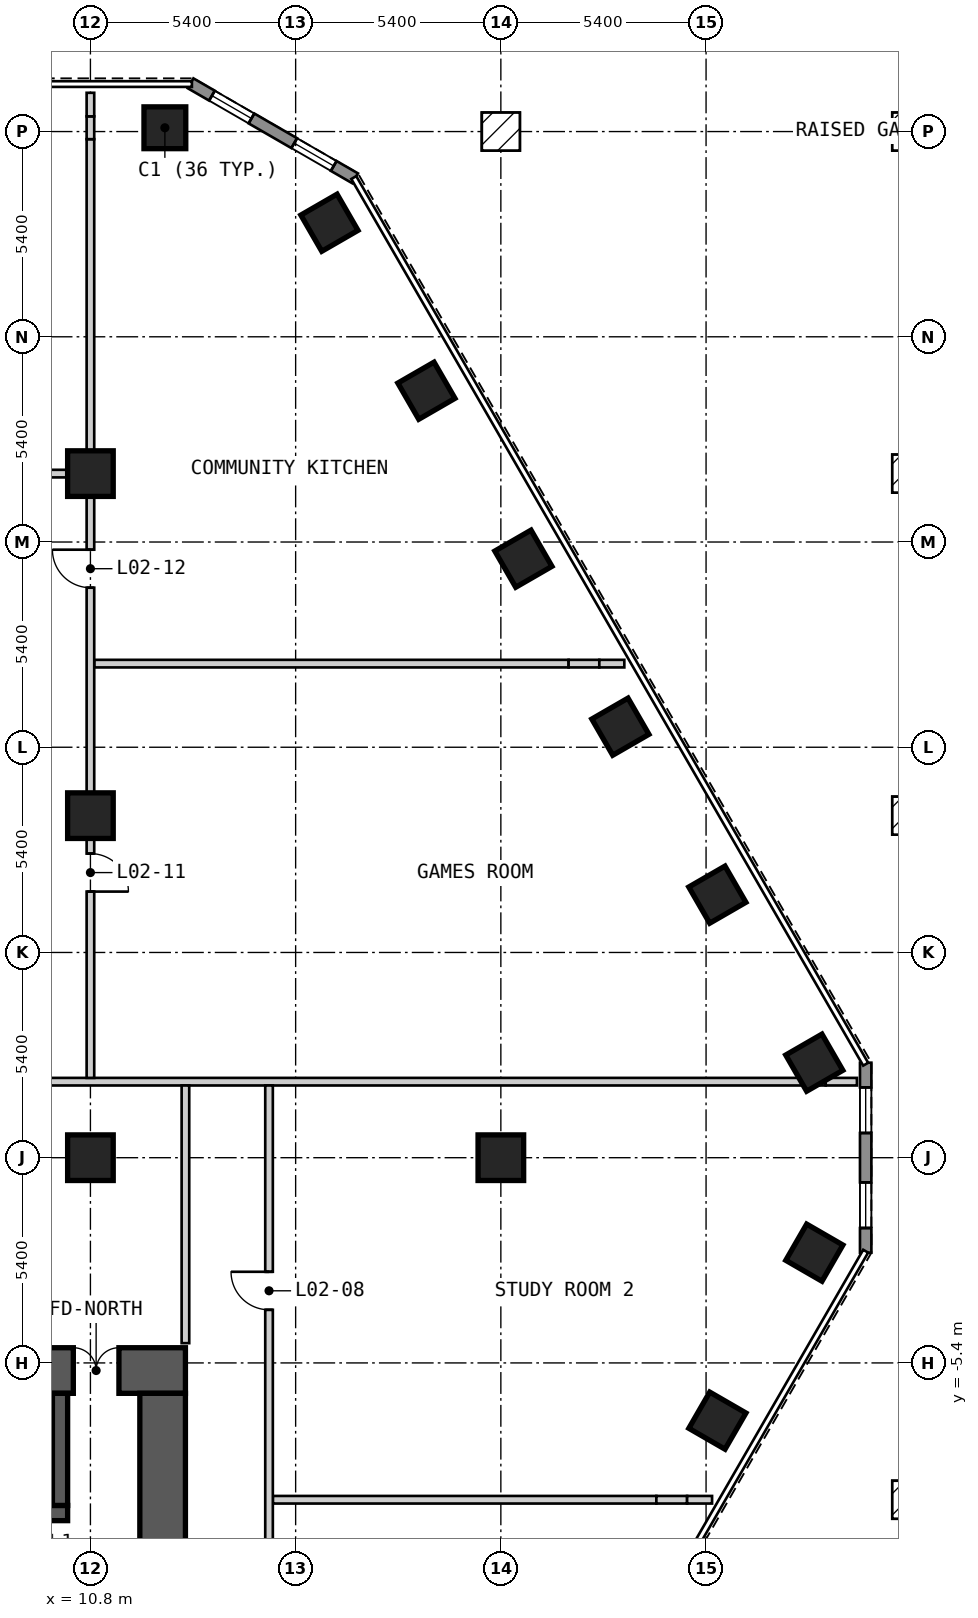
"""IFC4 building model, lengths in metres.
Left out: names, types, materials, properties, quantities, classifications, styles, units other than length and angle.
Written with IfcOpenShell. Run it as: python <this file> out.ifc"""

import sys

from ifc_helpers import new_model, si_unit, direction, frame, frame_2d, origin, origin_2d, place, context, subcontext, project, spatial, polyline, rectangle, outline, extrude, element, fill, save


model = new_model("IFC4")
c1 = context("Model", 3, precision=1e-05, world=origin(), true_north=direction((0.0, 1.0)))
c2 = subcontext(c1, "Body", "Model", "MODEL_VIEW")
j1 = project(units=[si_unit("LENGTHUNIT", "METRE"), si_unit("PLANEANGLEUNIT", "RADIAN")], contexts=[c1])
p1 = place(None, origin())
s1 = spatial("IfcSite", under=j1, at=p1, CompositionType="ELEMENT")
p2 = place(p1, origin())
s2 = spatial("IfcBuilding", under=s1, at=p2, CompositionType="ELEMENT")
p3 = place(p2, frame((0.0, 0.0, 9.0)))
s3 = spatial("IfcBuildingStorey", under=s2, at=p3, CompositionType="ELEMENT", Elevation=9.0)
for number, where, z_axis, x_axis in (
    (1, (12.759, 27.1, 0.0), (0.0, 0.0, 1.0), (-1.0, 0.0, 0.0)),
    (2, (27.298, -6.919, 0.0), (0.0, 0.0, 1.0), (0.5, 0.866, 0.0)),
    (3, (29.849, -2.499, 0.0), (0.0, 0.0, 1.0), (0.5, 0.866, 0.0)),
    (4, (29.848, 2.5, 0.0), (0.0, 0.0, 1.0), (-0.5, 0.866, 0.0)),
    (5, (27.297, 6.921, 0.0), (0.0, 0.0, 1.0), (-0.5, 0.866, 0.0)),
    (6, (24.745, 11.341, 0.0), (0.0, 0.0, 1.0), (-0.5, 0.866, 0.0)),
    (7, (22.193, 15.761, 0.0), (0.0, 0.0, 1.0), (-0.5, 0.866, 0.0)),
    (8, (19.641, 20.181, 0.0), (0.0, 0.0, 1.0), (-0.5, 0.866, 0.0)),
    (9, (17.089, 24.601, 0.0), (0.0, 0.0, 1.0), (-0.5, 0.866, 0.0)),
):
    element("IfcColumn", number, at=place(p3, frame(where, z_axis=z_axis, x_axis=x_axis)), inside=s3, PredefinedType="COLUMN", context=c2, shape_type="SweptSolid", body=[
        extrude(rectangle(XDim=1.1, YDim=1.1, at=origin_2d()), origin(), (0.0, 0.0, 1.0), 3.6),
    ])
for number, where, z_axis, x_axis in (
    (10, (10.8, 0.0, 0.0), (0.0, 0.0, 1.0), (1.0, 0.0, 0.0)),
    (11, (10.8, 9.0, 0.0), (0.0, 0.0, 1.0), (1.0, 0.0, 0.0)),
    (12, (10.8, 18.0, 0.0), (0.0, 0.0, 1.0), (1.0, 0.0, 0.0)),
    (13, (21.6, 0.0, 0.0), (0.0, 0.0, 1.0), (1.0, 0.0, 0.0)),
):
    element("IfcColumn", number, at=place(p3, frame(where, z_axis=z_axis, x_axis=x_axis)), inside=s3, PredefinedType="COLUMN", context=c2, shape_type="SweptSolid", body=[
        extrude(rectangle(XDim=1.2, YDim=1.2, at=origin_2d()), origin(), (0.0, 0.0, 1.0), 3.6),
    ])
p4 = place(p3, frame((-13.3, -5.6, 0.0), z_axis=(0.0, 0.0, 1.0), x_axis=(1.0, 0.0, 0.0)))
e14 = element("IfcWall", 14, at=p4, inside=s3, PredefinedType="SHEAR", context=c2, shape_type="SweptSolid", body=[
    extrude(rectangle(XDim=26.6, YDim=1.2, at=frame_2d((13.3, 0.0))), origin(), (0.0, 0.0, 1.0), 3.25),
])
p5 = place(p4, frame((23.65, 0.0, 0.0)))
e15 = element("IfcOpeningElement", 15, at=p5, cuts=e14, PredefinedType="OPENING", context=c2, shape_type="SweptSolid", body=[
    extrude(rectangle(XDim=1.2, YDim=2.1, at=frame_2d((0.6, 1.05))), frame((0.0, 0.61, 0.0), z_axis=(0.0, -1.0, 0.0), x_axis=(1.0, 0.0, 0.0)), (0.0, 0.0, 1.0), 1.22),
])
p6 = place(p3, frame((12.7, -17.8, 0.0), z_axis=(0.0, 0.0, 1.0), x_axis=(0.0, 1.0, 0.0)))
e16 = element("IfcWall", 16, at=p6, inside=s3, PredefinedType="SHEAR", context=c2, shape_type="SweptSolid", body=[
    extrude(rectangle(XDim=11.6, YDim=1.2, at=frame_2d((5.8, 0.0))), origin(), (0.0, 0.0, 1.0), 3.25),
])
p7 = place(p3, frame((-12.1, -9.35, 0.0), z_axis=(0.0, 0.0, 1.0), x_axis=(1.0, 0.0, 0.0)))
e17 = element("IfcWall", 17, at=p7, inside=s3, PredefinedType="SHEAR", context=c2, shape_type="SweptSolid", body=[
    extrude(rectangle(XDim=22.3, YDim=0.4, at=frame_2d((11.15, 0.0))), origin(), (0.0, 0.0, 1.0), 3.25),
])
p8 = place(p7, frame((0.7, 0.0, 0.0)))
e18 = element("IfcOpeningElement", 18, at=p8, cuts=e17, PredefinedType="OPENING", context=c2, shape_type="SweptSolid", body=[
    extrude(rectangle(XDim=1.1, YDim=2.1, at=frame_2d((0.55, 1.05))), frame((0.0, 0.21, 0.0), z_axis=(0.0, -1.0, 0.0), x_axis=(1.0, 0.0, 0.0)), (0.0, 0.0, 1.0), 0.42),
])
p9 = place(p7, frame((3.5, 0.0, 0.0)))
e19 = element("IfcOpeningElement", 19, at=p9, cuts=e17, PredefinedType="OPENING", context=c2, shape_type="SweptSolid", body=[
    extrude(rectangle(XDim=1.1, YDim=2.1, at=frame_2d((0.55, 1.05))), frame((0.0, 0.21, 0.0), z_axis=(0.0, -1.0, 0.0), x_axis=(1.0, 0.0, 0.0)), (0.0, 0.0, 1.0), 0.42),
])
p10 = place(p7, frame((6.3, 0.0, 0.0)))
e20 = element("IfcOpeningElement", 20, at=p10, cuts=e17, PredefinedType="OPENING", context=c2, shape_type="SweptSolid", body=[
    extrude(rectangle(XDim=1.1, YDim=2.1, at=frame_2d((0.55, 1.05))), frame((0.0, 0.21, 0.0), z_axis=(0.0, -1.0, 0.0), x_axis=(1.0, 0.0, 0.0)), (0.0, 0.0, 1.0), 0.42),
])
p11 = place(p7, frame((8.6, 0.0, 0.0)))
e21 = element("IfcOpeningElement", 21, at=p11, cuts=e17, PredefinedType="OPENING", context=c2, shape_type="SweptSolid", body=[
    extrude(rectangle(XDim=1.1, YDim=2.1, at=frame_2d((0.55, 1.05))), frame((0.0, 0.21, 0.0), z_axis=(0.0, -1.0, 0.0), x_axis=(1.0, 0.0, 0.0)), (0.0, 0.0, 1.0), 0.42),
])
p12 = place(p7, frame((10.9, 0.0, 0.0)))
e22 = element("IfcOpeningElement", 22, at=p12, cuts=e17, PredefinedType="OPENING", context=c2, shape_type="SweptSolid", body=[
    extrude(rectangle(XDim=1.1, YDim=2.1, at=frame_2d((0.55, 1.05))), frame((0.0, 0.21, 0.0), z_axis=(0.0, -1.0, 0.0), x_axis=(1.0, 0.0, 0.0)), (0.0, 0.0, 1.0), 0.42),
])
p13 = place(p7, frame((13.2, 0.0, 0.0)))
e23 = element("IfcOpeningElement", 23, at=p13, cuts=e17, PredefinedType="OPENING", context=c2, shape_type="SweptSolid", body=[
    extrude(rectangle(XDim=1.1, YDim=2.1, at=frame_2d((0.55, 1.05))), frame((0.0, 0.21, 0.0), z_axis=(0.0, -1.0, 0.0), x_axis=(1.0, 0.0, 0.0)), (0.0, 0.0, 1.0), 0.42),
])
p14 = place(p7, frame((15.5, 0.0, 0.0)))
e24 = element("IfcOpeningElement", 24, at=p14, cuts=e17, PredefinedType="OPENING", context=c2, shape_type="SweptSolid", body=[
    extrude(rectangle(XDim=1.1, YDim=2.1, at=frame_2d((0.55, 1.05))), frame((0.0, 0.21, 0.0), z_axis=(0.0, -1.0, 0.0), x_axis=(1.0, 0.0, 0.0)), (0.0, 0.0, 1.0), 0.42),
])
p15 = place(p7, frame((17.8, 0.0, 0.0)))
e25 = element("IfcOpeningElement", 25, at=p15, cuts=e17, PredefinedType="OPENING", context=c2, shape_type="SweptSolid", body=[
    extrude(rectangle(XDim=1.1, YDim=2.1, at=frame_2d((0.55, 1.05))), frame((0.0, 0.21, 0.0), z_axis=(0.0, -1.0, 0.0), x_axis=(1.0, 0.0, 0.0)), (0.0, 0.0, 1.0), 0.42),
])
p16 = place(p7, frame((20.2, 0.0, 0.0)))
e26 = element("IfcOpeningElement", 26, at=p16, cuts=e17, PredefinedType="OPENING", context=c2, shape_type="SweptSolid", body=[
    extrude(rectangle(XDim=1.1, YDim=2.1, at=frame_2d((0.55, 1.05))), frame((0.0, 0.21, 0.0), z_axis=(0.0, -1.0, 0.0), x_axis=(1.0, 0.0, 0.0)), (0.0, 0.0, 1.0), 0.42),
])
p17 = place(p3, frame((10.0, -9.15, 0.0), z_axis=(0.0, 0.0, 1.0), x_axis=(0.0, 1.0, 0.0)))
e27 = element("IfcWall", 27, at=p17, inside=s3, PredefinedType="SHEAR", context=c2, shape_type="SweptSolid", body=[
    extrude(rectangle(XDim=2.95, YDim=0.4, at=frame_2d((1.475, 0.0))), origin(), (0.0, 0.0, 1.0), 3.25),
])
p18 = place(p3, frame((31.2, -2.5, 0.0), z_axis=(0.0, 0.0, 1.0), x_axis=(0.0, 1.0, 0.0)))
e28 = element("IfcWall", 28, at=p18, inside=s3, PredefinedType="SOLIDWALL", context=c2, shape_type="SweptSolid", body=[
    extrude(outline(polyline([(0.0, -0.15), (5.0, -0.15), (4.92, 0.15), (0.08, 0.15), (0.0, -0.15)])), origin(), (0.0, 0.0, 1.0), 3.25),
])
p19 = place(p18, frame((0.65, 0.0, 0.15)))
e29 = element("IfcOpeningElement", 29, at=p19, cuts=e28, PredefinedType="OPENING", context=c2, shape_type="SweptSolid", body=[
    extrude(rectangle(XDim=1.2, YDim=2.1, at=frame_2d((0.6, 1.05))), frame((0.0, 0.16, 0.0), z_axis=(0.0, -1.0, 0.0), x_axis=(1.0, 0.0, 0.0)), (0.0, 0.0, 1.0), 0.32),
])
p20 = place(p18, frame((3.15, 0.0, 0.15)))
e30 = element("IfcOpeningElement", 30, at=p20, cuts=e28, PredefinedType="OPENING", context=c2, shape_type="SweptSolid", body=[
    extrude(rectangle(XDim=1.2, YDim=2.1, at=frame_2d((0.6, 1.05))), frame((0.0, 0.16, 0.0), z_axis=(0.0, -1.0, 0.0), x_axis=(1.0, 0.0, 0.0)), (0.0, 0.0, 1.0), 0.32),
])
p21 = place(p3, frame((17.765, 25.77, 0.0), z_axis=(0.0, 0.0, 1.0), x_axis=(-0.866010750942, 0.50002537861, 0.0)))
e31 = element("IfcWall", 31, at=p21, inside=s3, PredefinedType="SOLIDWALL", context=c2, shape_type="SweptSolid", body=[
    extrude(outline(polyline([(0.0, -0.15), (5.0, -0.15), (4.919, 0.15), (0.08, 0.15), (0.0, -0.15)])), origin(), (0.0, 0.0, 1.0), 3.25),
])
p22 = place(p21, frame((0.65, 0.0, 0.15)))
e32 = element("IfcOpeningElement", 32, at=p22, cuts=e31, PredefinedType="OPENING", context=c2, shape_type="SweptSolid", body=[
    extrude(rectangle(XDim=1.2, YDim=2.1, at=frame_2d((0.6, 1.05))), frame((0.0, 0.16, 0.0), z_axis=(0.0, -1.0, 0.0), x_axis=(1.0, 0.0, 0.0)), (0.0, 0.0, 1.0), 0.32),
])
p23 = place(p21, frame((3.15, 0.0, 0.15)))
e33 = element("IfcOpeningElement", 33, at=p23, cuts=e31, PredefinedType="OPENING", context=c2, shape_type="SweptSolid", body=[
    extrude(rectangle(XDim=1.2, YDim=2.1, at=frame_2d((0.6, 1.05))), frame((0.0, 0.16, 0.0), z_axis=(0.0, -1.0, 0.0), x_axis=(1.0, 0.0, 0.0)), (0.0, 0.0, 1.0), 0.32),
])
p24 = place(p3, frame((15.6, -9.0, 0.0), z_axis=(0.0, 0.0, 1.0), x_axis=(1.0, 0.0, 0.0)))
e34 = element("IfcWall", 34, at=p24, inside=s3, PredefinedType="PARTITIONING", context=c2, shape_type="SweptSolid", body=[
    extrude(rectangle(XDim=10.092, YDim=0.2, at=frame_2d((5.046, 0.0))), origin(), (0.0, 0.0, 1.0), 3.25),
])
p25 = place(p3, frame((25.692, -9.0, 0.0), z_axis=(0.0, 0.0, 1.0), x_axis=(1.0, 0.0, 0.0)))
e35 = element("IfcWall", 35, at=p25, inside=s3, PredefinedType="PARTITIONING", context=c2, shape_type="SweptSolid", body=[
    extrude(rectangle(XDim=0.809, YDim=0.2, at=frame_2d((0.405, 0.0))), origin(), (0.0, 0.0, 1.0), 2.52),
])
p26 = place(p3, frame((26.501, -9.0, 0.0), z_axis=(0.0, 0.0, 1.0), x_axis=(1.0, 0.0, 0.0)))
e36 = element("IfcWall", 36, at=p26, inside=s3, PredefinedType="PARTITIONING", context=c2, shape_type="SweptSolid", body=[
    extrude(rectangle(XDim=0.657, YDim=0.2, at=frame_2d((0.329, 0.0))), origin(), (0.0, 0.0, 1.0), 3.25),
])
p27 = place(p3, frame((-29.549, 2.0, 0.0), z_axis=(0.0, 0.0, 1.0), x_axis=(1.0, 0.0, 0.0)))
e37 = element("IfcWall", 37, at=p27, inside=s3, PredefinedType="PARTITIONING", context=c2, shape_type="SweptSolid", body=[
    extrude(rectangle(XDim=59.097, YDim=0.2, at=frame_2d((29.549, 0.0))), origin(), (0.0, 0.0, 1.0), 3.25),
])
p28 = place(p27, frame((20.651, 0.0, 0.0)))
e38 = element("IfcOpeningElement", 38, at=p28, cuts=e37, PredefinedType="OPENING", context=c2, shape_type="SweptSolid", body=[
    extrude(rectangle(XDim=1.8, YDim=2.1, at=frame_2d((0.9, 1.05))), frame((0.0, 0.11, 0.0), z_axis=(0.0, -1.0, 0.0), x_axis=(1.0, 0.0, 0.0)), (0.0, 0.0, 1.0), 0.22),
])
p29 = place(p27, frame((36.647, 0.0, 0.0)))
e39 = element("IfcOpeningElement", 39, at=p29, cuts=e37, PredefinedType="OPENING", context=c2, shape_type="SweptSolid", body=[
    extrude(rectangle(XDim=1.8, YDim=2.1, at=frame_2d((0.9, 1.05))), frame((0.0, 0.11, 0.0), z_axis=(0.0, -1.0, 0.0), x_axis=(1.0, 0.0, 0.0)), (0.0, 0.0, 1.0), 0.22),
])
p30 = place(p27, frame((28.649, 0.0, 0.0)))
e40 = element("IfcOpeningElement", 40, at=p30, cuts=e37, PredefinedType="OPENING", context=c2, shape_type="SweptSolid", body=[
    extrude(rectangle(XDim=1.8, YDim=2.1, at=frame_2d((0.9, 1.05))), frame((0.0, 0.11, 0.0), z_axis=(0.0, -1.0, 0.0), x_axis=(1.0, 0.0, 0.0)), (0.0, 0.0, 1.0), 0.22),
])
p31 = place(p3, frame((29.548, 2.0, 0.0), z_axis=(0.0, 0.0, 1.0), x_axis=(1.0, 0.0, 0.0)))
e41 = element("IfcWall", 41, at=p31, inside=s3, PredefinedType="PARTITIONING", context=c2, shape_type="SweptSolid", body=[
    extrude(rectangle(XDim=0.6, YDim=0.2, at=frame_2d((0.3, 0.0))), origin(), (0.0, 0.0, 1.0), 2.52),
])
p32 = place(p3, frame((30.148, 2.0, 0.0), z_axis=(0.0, 0.0, 1.0), x_axis=(1.0, 0.0, 0.0)))
e42 = element("IfcWall", 42, at=p32, inside=s3, PredefinedType="PARTITIONING", context=c2, shape_type="SweptSolid", body=[
    extrude(rectangle(XDim=0.822, YDim=0.2, at=frame_2d((0.411, 0.0))), origin(), (0.0, 0.0, 1.0), 3.25),
])
p33 = place(p3, frame((10.9, 13.0, 0.0), z_axis=(0.0, 0.0, 1.0), x_axis=(1.0, 0.0, 0.0)))
e43 = element("IfcWall", 43, at=p33, inside=s3, PredefinedType="PARTITIONING", context=c2, shape_type="SweptSolid", body=[
    extrude(rectangle(XDim=12.483, YDim=0.2, at=frame_2d((6.242, 0.0))), origin(), (0.0, 0.0, 1.0), 3.25),
])
p34 = place(p3, frame((23.383, 13.0, 0.0), z_axis=(0.0, 0.0, 1.0), x_axis=(1.0, 0.0, 0.0)))
e44 = element("IfcWall", 44, at=p34, inside=s3, PredefinedType="PARTITIONING", context=c2, shape_type="SweptSolid", body=[
    extrude(rectangle(XDim=0.808, YDim=0.2, at=frame_2d((0.404, 0.0))), origin(), (0.0, 0.0, 1.0), 2.52),
])
p35 = place(p3, frame((24.191, 13.0, 0.0), z_axis=(0.0, 0.0, 1.0), x_axis=(1.0, 0.0, 0.0)))
e45 = element("IfcWall", 45, at=p35, inside=s3, PredefinedType="PARTITIONING", context=c2, shape_type="SweptSolid", body=[
    extrude(rectangle(XDim=0.658, YDim=0.2, at=frame_2d((0.329, 0.0))), origin(), (0.0, 0.0, 1.0), 3.25),
])
p36 = place(p3, frame((-10.7, 18.0, 0.0), z_axis=(0.0, 0.0, 1.0), x_axis=(1.0, 0.0, 0.0)))
e46 = element("IfcWall", 46, at=p36, inside=s3, PredefinedType="PARTITIONING", context=c2, shape_type="SweptSolid", body=[
    extrude(rectangle(XDim=21.4, YDim=0.2, at=frame_2d((10.7, 0.0))), origin(), (0.0, 0.0, 1.0), 3.25),
])
p37 = place(p36, frame((8.86, 0.0, 0.0)))
e47 = element("IfcOpeningElement", 47, at=p37, cuts=e46, PredefinedType="OPENING", context=c2, shape_type="SweptSolid", body=[
    extrude(rectangle(XDim=1.0, YDim=2.1, at=frame_2d((0.5, 1.05))), frame((0.0, 0.11, 0.0), z_axis=(0.0, -1.0, 0.0), x_axis=(1.0, 0.0, 0.0)), (0.0, 0.0, 1.0), 0.22),
])
p38 = place(p3, frame((10.8, 2.1, 0.0), z_axis=(0.0, 0.0, 1.0), x_axis=(0.0, 1.0, 0.0)))
e48 = element("IfcWall", 48, at=p38, inside=s3, PredefinedType="PARTITIONING", context=c2, shape_type="SweptSolid", body=[
    extrude(rectangle(XDim=24.7, YDim=0.2, at=frame_2d((12.35, 0.0))), origin(), (0.0, 0.0, 1.0), 3.25),
])
p39 = place(p38, frame((5.902, 0.0, 0.0), z_axis=(0.0, 0.0, 1.0), x_axis=(-1.0, 0.0, 0.0)))
e49 = element("IfcOpeningElement", 49, at=p39, cuts=e48, PredefinedType="OPENING", context=c2, shape_type="SweptSolid", body=[
    extrude(rectangle(XDim=1.0, YDim=2.1, at=frame_2d((0.5, 1.05))), frame((0.0, 0.11, 0.0), z_axis=(0.0, -1.0, 0.0), x_axis=(1.0, 0.0, 0.0)), (0.0, 0.0, 1.0), 0.22),
])
p40 = place(p38, frame((13.898, 0.0, 0.0), z_axis=(0.0, 0.0, 1.0), x_axis=(-1.0, 0.0, 0.0)))
e50 = element("IfcOpeningElement", 50, at=p40, cuts=e48, PredefinedType="OPENING", context=c2, shape_type="SweptSolid", body=[
    extrude(rectangle(XDim=1.0, YDim=2.1, at=frame_2d((0.5, 1.05))), frame((0.0, 0.11, 0.0), z_axis=(0.0, -1.0, 0.0), x_axis=(1.0, 0.0, 0.0)), (0.0, 0.0, 1.0), 0.22),
])
p41 = place(p3, frame((10.8, 26.8, 0.0), z_axis=(0.0, 0.0, 1.0), x_axis=(0.0, 1.0, 0.0)))
e51 = element("IfcWall", 51, at=p41, inside=s3, PredefinedType="PARTITIONING", context=c2, shape_type="SweptSolid", body=[
    extrude(rectangle(XDim=0.6, YDim=0.2, at=frame_2d((0.3, 0.0))), origin(), (0.0, 0.0, 1.0), 2.52),
])
p42 = place(p3, frame((10.8, 27.4, 0.0), z_axis=(0.0, 0.0, 1.0), x_axis=(0.0, 1.0, 0.0)))
e52 = element("IfcWall", 52, at=p42, inside=s3, PredefinedType="PARTITIONING", context=c2, shape_type="SweptSolid", body=[
    extrude(rectangle(XDim=0.62, YDim=0.2, at=frame_2d((0.31, 0.0))), origin(), (0.0, 0.0, 1.0), 3.25),
])
p43 = place(p3, frame((13.3, -4.88, 0.0), z_axis=(0.0, 0.0, 1.0), x_axis=(0.0, 1.0, 0.0)))
e53 = element("IfcWall", 53, at=p43, inside=s3, PredefinedType="PARTITIONING", context=c2, shape_type="SweptSolid", body=[
    extrude(rectangle(XDim=6.78, YDim=0.2, at=frame_2d((3.39, 0.0))), origin(), (0.0, 0.0, 1.0), 3.25),
])
p44 = place(p3, frame((15.5, -25.114, 0.0), z_axis=(0.0, 0.0, 1.0), x_axis=(0.0, 1.0, 0.0)))
e54 = element("IfcWall", 54, at=p44, inside=s3, PredefinedType="PARTITIONING", context=c2, shape_type="SweptSolid", body=[
    extrude(rectangle(XDim=27.014, YDim=0.2, at=frame_2d((13.507, 0.0))), origin(), (0.0, 0.0, 1.0), 3.25),
])
p45 = place(p44, frame((10.516, 0.0, 0.0), z_axis=(0.0, 0.0, 1.0), x_axis=(-1.0, 0.0, 0.0)))
e55 = element("IfcOpeningElement", 55, at=p45, cuts=e54, PredefinedType="OPENING", context=c2, shape_type="SweptSolid", body=[
    extrude(rectangle(XDim=1.0, YDim=2.1, at=frame_2d((0.5, 1.05))), frame((0.0, 0.11, 0.0), z_axis=(0.0, -1.0, 0.0), x_axis=(1.0, 0.0, 0.0)), (0.0, 0.0, 1.0), 0.22),
])
p46 = place(p44, frame((22.112, 0.0, 0.0), z_axis=(0.0, 0.0, 1.0), x_axis=(-1.0, 0.0, 0.0)))
e56 = element("IfcOpeningElement", 56, at=p46, cuts=e54, PredefinedType="OPENING", context=c2, shape_type="SweptSolid", body=[
    extrude(rectangle(XDim=1.0, YDim=2.1, at=frame_2d((0.5, 1.05))), frame((0.0, 0.11, 0.0), z_axis=(0.0, -1.0, 0.0), x_axis=(1.0, 0.0, 0.0)), (0.0, 0.0, 1.0), 0.22),
])
p47 = place(p19, origin())
e57 = element("IfcWindow", 57, at=p47, inside=s3, PartitioningType="SINGLE_PANEL", PredefinedType="WINDOW", context=c2, shape_type="SweptSolid", body=[
    extrude(rectangle(XDim=1.2, YDim=2.1, at=frame_2d((0.6, 1.05))), frame((0.0, 0.03, 0.0), z_axis=(0.0, -1.0, 0.0), x_axis=(1.0, 0.0, 0.0)), (0.0, 0.0, 1.0), 0.06),
])
fill(e29, e57)
p48 = place(p20, origin())
e58 = element("IfcWindow", 58, at=p48, inside=s3, PartitioningType="SINGLE_PANEL", PredefinedType="WINDOW", context=c2, shape_type="SweptSolid", body=[
    extrude(rectangle(XDim=1.2, YDim=2.1, at=frame_2d((0.6, 1.05))), frame((0.0, 0.03, 0.0), z_axis=(0.0, -1.0, 0.0), x_axis=(1.0, 0.0, 0.0)), (0.0, 0.0, 1.0), 0.06),
])
fill(e30, e58)
p49 = place(p22, origin())
e59 = element("IfcWindow", 59, at=p49, inside=s3, PartitioningType="SINGLE_PANEL", PredefinedType="WINDOW", context=c2, shape_type="SweptSolid", body=[
    extrude(rectangle(XDim=1.2, YDim=2.1, at=frame_2d((0.6, 1.05))), frame((0.0, 0.03, 0.0), z_axis=(0.0, -1.0, 0.0), x_axis=(1.0, 0.0, 0.0)), (0.0, 0.0, 1.0), 0.06),
])
fill(e32, e59)
p50 = place(p23, origin())
e60 = element("IfcWindow", 60, at=p50, inside=s3, PartitioningType="SINGLE_PANEL", PredefinedType="WINDOW", context=c2, shape_type="SweptSolid", body=[
    extrude(rectangle(XDim=1.2, YDim=2.1, at=frame_2d((0.6, 1.05))), frame((0.0, 0.03, 0.0), z_axis=(0.0, -1.0, 0.0), x_axis=(1.0, 0.0, 0.0)), (0.0, 0.0, 1.0), 0.06),
])
fill(e33, e60)
p51 = place(p46, origin())
e61 = element("IfcDoor", 61, at=p51, inside=s3, OperationType="SINGLE_SWING_LEFT", PredefinedType="DOOR", context=c2, shape_type="SweptSolid", body=[
    extrude(rectangle(XDim=1.0, YDim=2.1, at=frame_2d((0.5, 1.05))), frame((0.0, 0.025, 0.0), z_axis=(0.0, -1.0, 0.0), x_axis=(1.0, 0.0, 0.0)), (0.0, 0.0, 1.0), 0.05),
])
fill(e56, e61)
p52 = place(p39, origin())
e62 = element("IfcDoor", 62, at=p52, inside=s3, OperationType="SINGLE_SWING_RIGHT", PredefinedType="DOOR", context=c2, shape_type="SweptSolid", body=[
    extrude(rectangle(XDim=1.0, YDim=2.1, at=frame_2d((0.5, 1.05))), frame((0.0, 0.025, 0.0), z_axis=(0.0, -1.0, 0.0), x_axis=(1.0, 0.0, 0.0)), (0.0, 0.0, 1.0), 0.05),
])
fill(e49, e62)
p53 = place(p40, origin())
e63 = element("IfcDoor", 63, at=p53, inside=s3, OperationType="SINGLE_SWING_LEFT", PredefinedType="DOOR", context=c2, shape_type="SweptSolid", body=[
    extrude(rectangle(XDim=1.0, YDim=2.1, at=frame_2d((0.5, 1.05))), frame((0.0, 0.025, 0.0), z_axis=(0.0, -1.0, 0.0), x_axis=(1.0, 0.0, 0.0)), (0.0, 0.0, 1.0), 0.05),
])
fill(e50, e63)
p54 = place(p5, origin())
e64 = element("IfcDoor", 64, at=p54, inside=s3, OperationType="DOUBLE_DOOR_SINGLE_SWING", PredefinedType="DOOR", context=c2, shape_type="SweptSolid", body=[
    extrude(rectangle(XDim=1.2, YDim=2.1, at=frame_2d((0.6, 1.05))), frame((0.0, 0.025, 0.0), z_axis=(0.0, -1.0, 0.0), x_axis=(1.0, 0.0, 0.0)), (0.0, 0.0, 1.0), 0.05),
])
fill(e15, e64)
save(model, sys.argv[1])
